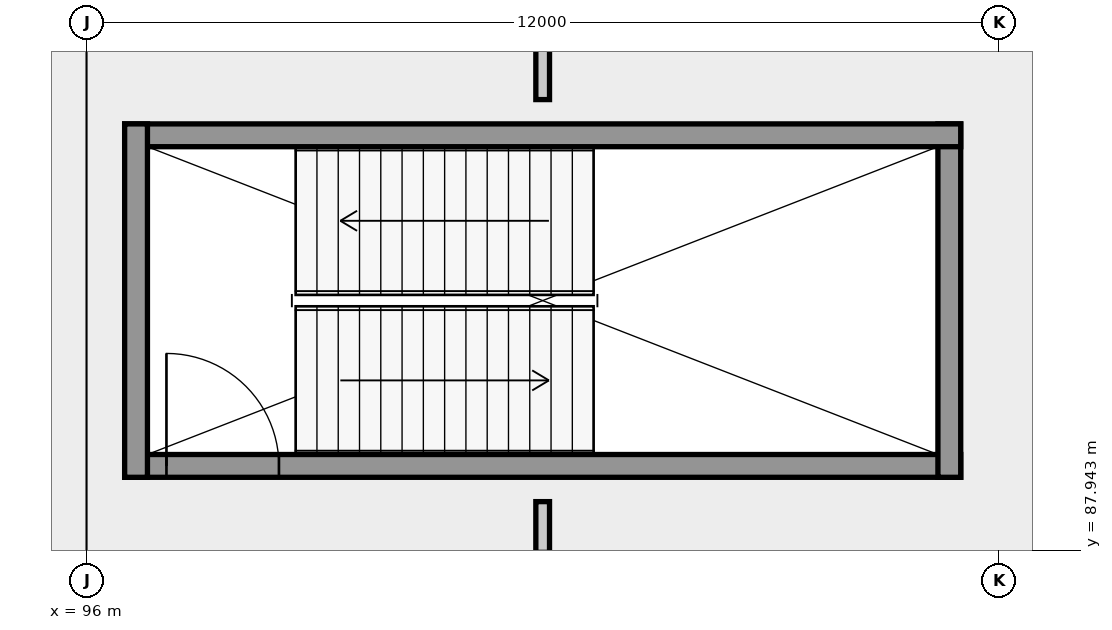
"""IFC4 building model, lengths in metres.
Left out: names, types, materials, properties, quantities, classifications, styles, units other than length and angle.
Written with IfcOpenShell. Run it as: python <this file> out.ifc"""

import sys

from ifc_helpers import new_model, si_unit, direction, frame, frame_2d, origin, place, context, subcontext, project, spatial, rectangle, extrude, element, fill, save


model = new_model("IFC4")
c1 = context("Model", 3, precision=1e-05, world=origin(), true_north=direction((0.0, 1.0)))
c2 = subcontext(c1, "Body", "Model", "MODEL_VIEW")
j1 = project(units=[si_unit("LENGTHUNIT", "METRE"), si_unit("PLANEANGLEUNIT", "RADIAN")], contexts=[c1])
p1 = place(None, origin())
s1 = spatial("IfcSite", under=j1, at=p1, CompositionType="ELEMENT")
p2 = place(p1, origin())
s2 = spatial("IfcBuilding", under=s1, at=p2, CompositionType="ELEMENT")
p3 = place(p2, frame((0.0, 0.0, 5.4)))
s3 = spatial("IfcBuildingStorey", under=s2, at=p3, CompositionType="ELEMENT", Elevation=5.4)
p4 = place(p3, frame((96.5, 89.05, 0.0), z_axis=(0.0, 0.0, 1.0), x_axis=(1.0, 0.0, 0.0)))
e1 = element("IfcWall", 1, at=p4, inside=s3, PredefinedType="SHEAR", context=c2, shape_type="SweptSolid", body=[
    extrude(rectangle(XDim=11.0, YDim=0.3, at=frame_2d((5.5, 0.0))), origin(), (0.0, 0.0, 1.0), 5.11),
])
p5 = place(p4, frame((0.55, 0.0, 0.0)))
e2 = element("IfcOpeningElement", 2, at=p5, cuts=e1, PredefinedType="OPENING", context=c2, shape_type="SweptSolid", body=[
    extrude(rectangle(XDim=1.48, YDim=2.3, at=frame_2d((0.74, 1.15))), frame((0.0, 0.16, 0.0), z_axis=(0.0, -1.0, 0.0), x_axis=(1.0, 0.0, 0.0)), (0.0, 0.0, 1.0), 0.32),
])
p6 = place(p3, frame((107.35, 88.9, 0.0), z_axis=(0.0, 0.0, 1.0), x_axis=(0.0, 1.0, 0.0)))
e3 = element("IfcWall", 3, at=p6, inside=s3, PredefinedType="SHEAR", context=c2, shape_type="SweptSolid", body=[
    extrude(rectangle(XDim=4.65, YDim=0.3, at=frame_2d((2.325, 0.0))), origin(), (0.0, 0.0, 1.0), 5.11),
])
p7 = place(p3, frame((107.5, 93.4, 0.0), z_axis=(0.0, 0.0, 1.0), x_axis=(-1.0, 0.0, 0.0)))
e4 = element("IfcWall", 4, at=p7, inside=s3, PredefinedType="SHEAR", context=c2, shape_type="SweptSolid", body=[
    extrude(rectangle(XDim=11.0, YDim=0.3, at=frame_2d((5.5, 0.0))), origin(), (0.0, 0.0, 1.0), 5.11),
])
p8 = place(p3, frame((96.65, 93.55, 0.0), z_axis=(0.0, 0.0, 1.0), x_axis=(0.0, -1.0, 0.0)))
e5 = element("IfcWall", 5, at=p8, inside=s3, PredefinedType="SHEAR", context=c2, shape_type="SweptSolid", body=[
    extrude(rectangle(XDim=4.65, YDim=0.3, at=frame_2d((2.325, 0.0))), origin(), (0.0, 0.0, 1.0), 5.11),
])
p9 = place(p3, frame((102.0, 84.38, 0.0), z_axis=(0.0, 0.0, 1.0), x_axis=(0.0, 1.0, 0.0)))
e6 = element("IfcWall", 6, at=p9, inside=s3, PredefinedType="PARTITIONING", context=c2, shape_type="SweptSolid", body=[
    extrude(rectangle(XDim=4.2, YDim=0.18, at=frame_2d((2.1, 0.0))), origin(), (0.0, 0.0, 1.0), 5.09),
])
p10 = place(p9, frame((1.05, 0.0, 0.0)))
e7 = element("IfcOpeningElement", 7, at=p10, cuts=e6, PredefinedType="OPENING", context=c2, shape_type="SweptSolid", body=[
    extrude(rectangle(XDim=2.5, YDim=2.75, at=frame_2d((1.25, 1.375))), frame((0.0, 0.1, 0.0), z_axis=(0.0, -1.0, 0.0), x_axis=(1.0, 0.0, 0.0)), (0.0, 0.0, 1.0), 0.2),
])
p11 = place(p3, frame((102.0, 93.87, 0.0), z_axis=(0.0, 0.0, 1.0), x_axis=(0.0, 1.0, 0.0)))
e8 = element("IfcWall", 8, at=p11, inside=s3, PredefinedType="PARTITIONING", context=c2, shape_type="SweptSolid", body=[
    extrude(rectangle(XDim=1.75, YDim=0.18, at=frame_2d((0.875, 0.0))), origin(), (0.0, 0.0, 1.0), 5.09),
])
p12 = place(p5, origin())
e9 = element("IfcDoor", 9, at=p12, inside=s3, OperationType="DOUBLE_DOOR_SINGLE_SWING", PredefinedType="DOOR", context=c2, shape_type="SweptSolid", body=[
    extrude(rectangle(XDim=1.48, YDim=2.3, at=frame_2d((0.74, 1.15))), frame((0.0, 0.025, 0.0), z_axis=(0.0, -1.0, 0.0), x_axis=(1.0, 0.0, 0.0)), (0.0, 0.0, 1.0), 0.05),
])
fill(e2, e9)
save(model, sys.argv[1])
